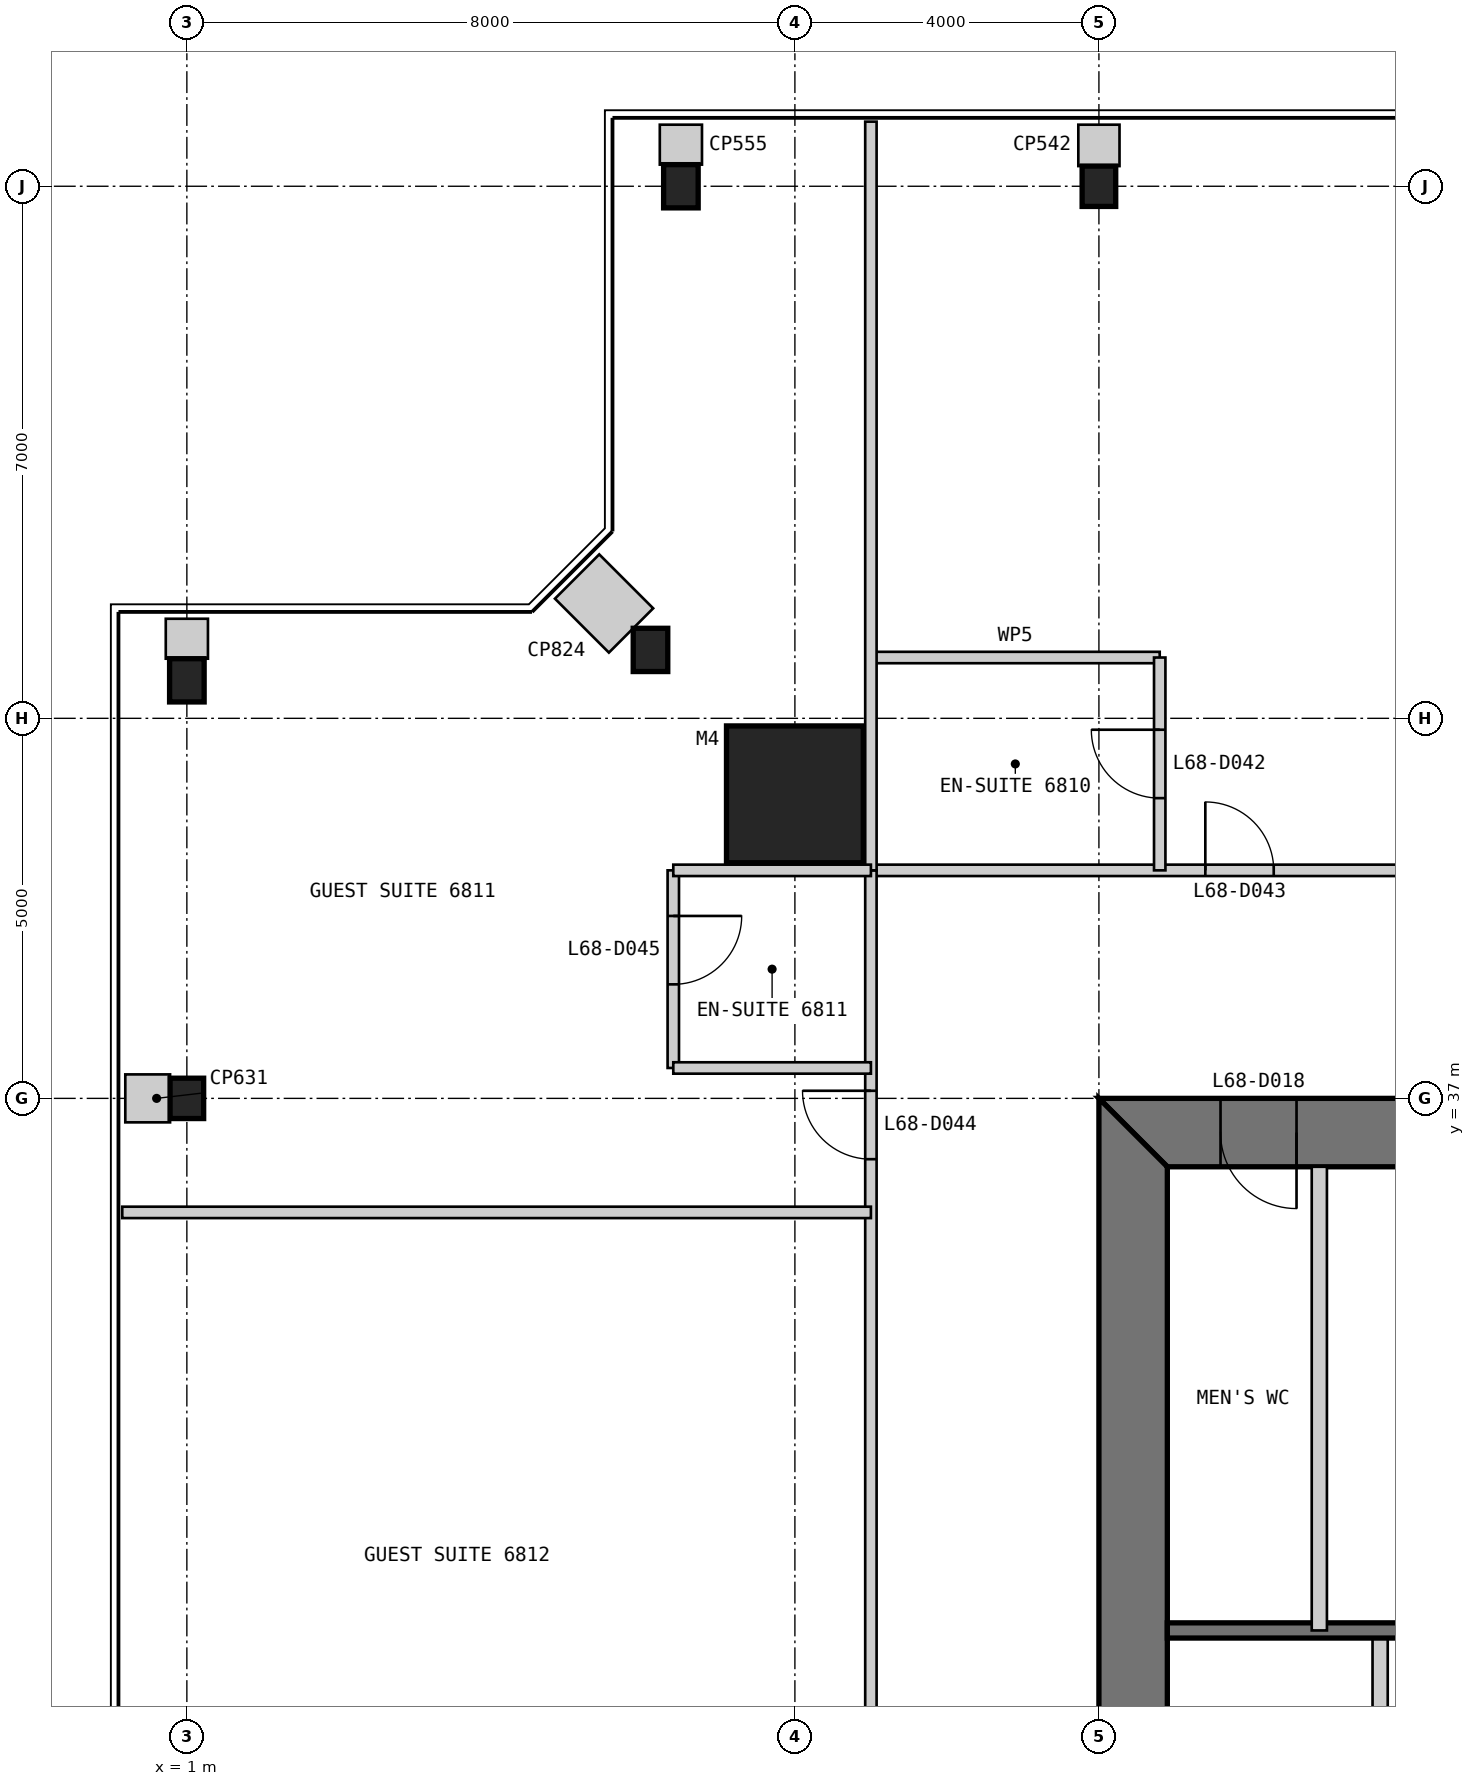
"""IFC4 building model, lengths in metres.
Left out: names, types, materials, properties, quantities, classifications, styles, units other than length and angle.
Written with IfcOpenShell. Run it as: python <this file> out.ifc"""

import sys

from ifc_helpers import new_model, si_unit, direction, frame, frame_2d, origin, origin_2d, place, context, subcontext, project, spatial, polyline, rectangle, i_section, outline, extrude, element, fill, save


model = new_model("IFC4")
c1 = context("Model", 3, precision=1e-05, world=origin(), true_north=direction((0.0, 1.0)))
c2 = subcontext(c1, "Body", "Model", "MODEL_VIEW")
j1 = project(units=[si_unit("LENGTHUNIT", "METRE"), si_unit("PLANEANGLEUNIT", "RADIAN")], contexts=[c1])
p1 = place(None, origin())
s1 = spatial("IfcSite", under=j1, at=p1, CompositionType="ELEMENT")
p2 = place(p1, origin())
s2 = spatial("IfcBuilding", under=s1, at=p2, CompositionType="ELEMENT")
p3 = place(p2, frame((0.0, 0.0, 283.2)))
s3 = spatial("IfcBuildingStorey", under=s2, at=p3, CompositionType="ELEMENT", Elevation=283.2)
p4 = place(p3, frame((9.0, 41.0, 0.0), z_axis=(0.0, 0.0, 1.0), x_axis=(1.0, 0.0, 0.0)))
e1 = element("IfcColumn", 1, at=p4, inside=s3, PredefinedType="COLUMN", context=c2, shape_type="SweptSolid", body=[
    extrude(rectangle(XDim=1.8, YDim=1.8, at=origin_2d()), origin(), (0.0, 0.0, 1.0), 3.4),
])
p5 = place(p3, frame((13.0, 49.0, 0.0), z_axis=(0.0, 0.0, 1.0), x_axis=(1.0, 0.0, 0.0)))
e2 = element("IfcColumn", 2, at=p5, inside=s3, PredefinedType="COLUMN", context=c2, shape_type="SweptSolid", body=[
    extrude(i_section(OverallWidth=0.442, OverallDepth=0.531, WebThickness=0.066, FlangeThickness=0.106, at=origin_2d()), origin(), (0.0, 0.0, 1.0), 3.4),
])
for number, where, z_axis, x_axis in (
    (3, (7.5, 49.0, 0.0), (0.0, 0.0, 1.0), (1.0, 0.0, 0.0)),
    (4, (7.1, 42.9, 0.0), (0.0, 0.0, 1.0), (1.0, 0.0, 0.0)),
    (5, (1.0, 42.5, 0.0), (0.0, 0.0, 1.0), (1.0, 0.0, 0.0)),
):
    element("IfcColumn", number, at=place(p3, frame(where, z_axis=z_axis, x_axis=x_axis)), inside=s3, PredefinedType="COLUMN", context=c2, shape_type="SweptSolid", body=[
        extrude(i_section(OverallWidth=0.455, OverallDepth=0.569, WebThickness=0.078, FlangeThickness=0.125, at=origin_2d()), origin(), (0.0, 0.0, 1.0), 3.4),
    ])
p6 = place(p3, frame((1.0, 37.0, 0.0), z_axis=(0.0, 0.0, 1.0), x_axis=(1.0, 0.0, 0.0)))
e6 = element("IfcColumn", 6, at=p6, inside=s3, PredefinedType="COLUMN", context=c2, shape_type="SweptSolid", body=[
    extrude(i_section(OverallWidth=0.442, OverallDepth=0.531, WebThickness=0.066, FlangeThickness=0.106, at=origin_2d()), origin(), (0.0, 0.0, 1.0), 3.4),
])
p7 = place(p3, frame((37.0, 36.55, 0.0), z_axis=(0.0, 0.0, 1.0), x_axis=(-1.0, 0.0, 0.0)))
e7 = element("IfcWall", 7, at=p7, inside=s3, PredefinedType="SHEAR", context=c2, shape_type="SweptSolid", body=[
    extrude(outline(polyline([(0.0, -0.45), (24.0, -0.45), (23.1, 0.45), (0.9, 0.45), (0.0, -0.45)])), origin(), (0.0, 0.0, 1.0), 3.4),
])
p8 = place(p7, frame((4.9, 0.0, 0.0)))
e8 = element("IfcOpeningElement", 8, at=p8, cuts=e7, PredefinedType="OPENING", context=c2, shape_type="SweptSolid", body=[
    extrude(rectangle(XDim=1.0, YDim=2.2, at=frame_2d((0.5, 1.1))), frame((0.0, 0.46, 0.0), z_axis=(0.0, -1.0, 0.0), x_axis=(1.0, 0.0, 0.0)), (0.0, 0.0, 1.0), 0.92),
])
p9 = place(p7, frame((8.9, 0.0, 0.0)))
e9 = element("IfcOpeningElement", 9, at=p9, cuts=e7, PredefinedType="OPENING", context=c2, shape_type="SweptSolid", body=[
    extrude(rectangle(XDim=1.1, YDim=2.2, at=frame_2d((0.55, 1.1))), frame((0.0, 0.46, 0.0), z_axis=(0.0, -1.0, 0.0), x_axis=(1.0, 0.0, 0.0)), (0.0, 0.0, 1.0), 0.92),
])
p10 = place(p7, frame((15.05, 0.0, 0.0)))
e10 = element("IfcOpeningElement", 10, at=p10, cuts=e7, PredefinedType="OPENING", context=c2, shape_type="SweptSolid", body=[
    extrude(rectangle(XDim=0.9, YDim=2.2, at=frame_2d((0.45, 1.1))), frame((0.0, 0.46, 0.0), z_axis=(0.0, -1.0, 0.0), x_axis=(1.0, 0.0, 0.0)), (0.0, 0.0, 1.0), 0.92),
])
p11 = place(p7, frame((17.9, 0.0, 0.0)))
e11 = element("IfcOpeningElement", 11, at=p11, cuts=e7, PredefinedType="OPENING", context=c2, shape_type="SweptSolid", body=[
    extrude(rectangle(XDim=1.0, YDim=2.2, at=frame_2d((0.5, 1.1))), frame((0.0, 0.46, 0.0), z_axis=(0.0, -1.0, 0.0), x_axis=(1.0, 0.0, 0.0)), (0.0, 0.0, 1.0), 0.92),
])
p12 = place(p7, frame((21.4, 0.0, 0.0)))
e12 = element("IfcOpeningElement", 12, at=p12, cuts=e7, PredefinedType="OPENING", context=c2, shape_type="SweptSolid", body=[
    extrude(rectangle(XDim=1.0, YDim=2.2, at=frame_2d((0.5, 1.1))), frame((0.0, 0.46, 0.0), z_axis=(0.0, -1.0, 0.0), x_axis=(1.0, 0.0, 0.0)), (0.0, 0.0, 1.0), 0.92),
])
p13 = place(p3, frame((13.45, 36.1, 0.0), z_axis=(0.0, 0.0, 1.0), x_axis=(0.0, -1.0, 0.0)))
e13 = element("IfcWall", 13, at=p13, inside=s3, PredefinedType="SHEAR", context=c2, shape_type="SweptSolid", body=[
    extrude(outline(polyline([(-0.9, -0.45), (23.1, -0.45), (22.2, 0.45), (0.0, 0.45), (-0.9, -0.45)])), origin(), (0.0, 0.0, 1.0), 3.4),
])
p14 = place(p13, frame((20.2, 0.0, 0.0)))
e14 = element("IfcOpeningElement", 14, at=p14, cuts=e13, PredefinedType="OPENING", context=c2, shape_type="SweptSolid", body=[
    extrude(rectangle(XDim=1.0, YDim=2.2, at=frame_2d((0.5, 1.1))), frame((0.0, 0.46, 0.0), z_axis=(0.0, -1.0, 0.0), x_axis=(1.0, 0.0, 0.0)), (0.0, 0.0, 1.0), 0.92),
])
p15 = place(p13, frame((17.25, 0.0, 0.0)))
e15 = element("IfcOpeningElement", 15, at=p15, cuts=e13, PredefinedType="OPENING", context=c2, shape_type="SweptSolid", body=[
    extrude(rectangle(XDim=0.9, YDim=2.2, at=frame_2d((0.45, 1.1))), frame((0.0, 0.46, 0.0), z_axis=(0.0, -1.0, 0.0), x_axis=(1.0, 0.0, 0.0)), (0.0, 0.0, 1.0), 0.92),
])
p16 = place(p3, frame((16.7, 13.9, 0.0), z_axis=(0.0, 0.0, 1.0), x_axis=(0.0, 1.0, 0.0)))
e16 = element("IfcWall", 16, at=p16, inside=s3, PredefinedType="PARTITIONING", context=c2, shape_type="SweptSolid", body=[
    extrude(rectangle(XDim=16.1, YDim=0.2, at=frame_2d((8.05, 0.0))), origin(), (0.0, 0.0, 1.0), 3.2),
])
p17 = place(p16, frame((8.15, 0.0, 0.0)))
e17 = element("IfcOpeningElement", 17, at=p17, cuts=e16, PredefinedType="OPENING", context=c2, shape_type="SweptSolid", body=[
    extrude(rectangle(XDim=0.9, YDim=2.2, at=frame_2d((0.45, 1.1))), frame((0.0, 0.11, 0.0), z_axis=(0.0, -1.0, 0.0), x_axis=(1.0, 0.0, 0.0)), (0.0, 0.0, 1.0), 0.22),
])
p18 = place(p16, frame((12.4, 0.0, 0.0)))
e18 = element("IfcOpeningElement", 18, at=p18, cuts=e16, PredefinedType="OPENING", context=c2, shape_type="SweptSolid", body=[
    extrude(rectangle(XDim=0.9, YDim=2.2, at=frame_2d((0.45, 1.1))), frame((0.0, 0.11, 0.0), z_axis=(0.0, -1.0, 0.0), x_axis=(1.0, 0.0, 0.0)), (0.0, 0.0, 1.0), 0.22),
])
p19 = place(p3, frame((29.7, 30.0, 0.0), z_axis=(0.0, 0.0, 1.0), x_axis=(-1.0, 0.0, 0.0)))
e19 = element("IfcWall", 19, at=p19, inside=s3, PredefinedType="SOLIDWALL", context=c2, shape_type="SweptSolid", body=[
    extrude(rectangle(XDim=15.8, YDim=0.2, at=frame_2d((7.9, 0.0))), origin(), (0.0, 0.0, 1.0), 3.2),
])
p20 = place(p3, frame((15.9, 36.1, 0.0), z_axis=(0.0, 0.0, 1.0), x_axis=(0.0, -1.0, 0.0)))
e20 = element("IfcWall", 20, at=p20, inside=s3, PredefinedType="PARTITIONING", context=c2, shape_type="SweptSolid", body=[
    extrude(rectangle(XDim=6.1, YDim=0.2, at=frame_2d((3.05, 0.0))), origin(), (0.0, 0.0, 1.0), 3.2),
])
p21 = place(p3, frame((40.0, 40.0, 0.0), z_axis=(0.0, 0.0, 1.0), x_axis=(-1.0, 0.0, 0.0)))
e21 = element("IfcWall", 21, at=p21, inside=s3, PredefinedType="PARTITIONING", context=c2, shape_type="SweptSolid", body=[
    extrude(rectangle(XDim=30.0, YDim=0.15, at=frame_2d((15.0, 0.0))), origin(), (0.0, 0.0, 1.0), 3.25),
])
p22 = place(p21, frame((2.9, 0.0, 0.0)))
e22 = element("IfcOpeningElement", 22, at=p22, cuts=e21, PredefinedType="OPENING", context=c2, shape_type="SweptSolid", body=[
    extrude(rectangle(XDim=0.9, YDim=2.1, at=frame_2d((0.45, 1.05))), frame((0.0, 0.085, 0.0), z_axis=(0.0, -1.0, 0.0), x_axis=(1.0, 0.0, 0.0)), (0.0, 0.0, 1.0), 0.17),
])
p23 = place(p21, frame((11.2, 0.0, 0.0)))
e23 = element("IfcOpeningElement", 23, at=p23, cuts=e21, PredefinedType="OPENING", context=c2, shape_type="SweptSolid", body=[
    extrude(rectangle(XDim=0.9, YDim=2.1, at=frame_2d((0.45, 1.05))), frame((0.0, 0.085, 0.0), z_axis=(0.0, -1.0, 0.0), x_axis=(1.0, 0.0, 0.0)), (0.0, 0.0, 1.0), 0.17),
])
p24 = place(p21, frame((24.7, 0.0, 0.0)))
e24 = element("IfcOpeningElement", 24, at=p24, cuts=e21, PredefinedType="OPENING", context=c2, shape_type="SweptSolid", body=[
    extrude(rectangle(XDim=0.9, YDim=2.1, at=frame_2d((0.45, 1.05))), frame((0.0, 0.085, 0.0), z_axis=(0.0, -1.0, 0.0), x_axis=(1.0, 0.0, 0.0)), (0.0, 0.0, 1.0), 0.17),
])
p25 = place(p3, frame((13.8, 42.8, 0.0), z_axis=(0.0, 0.0, 1.0), x_axis=(-1.0, 0.0, 0.0)))
e25 = element("IfcWall", 25, at=p25, inside=s3, PredefinedType="PARTITIONING", context=c2, shape_type="SweptSolid", body=[
    extrude(rectangle(XDim=3.8, YDim=0.15, at=frame_2d((1.9, 0.0))), origin(), (0.0, 0.0, 1.0), 3.25),
])
p26 = place(p3, frame((13.8, 42.8, 0.0), z_axis=(0.0, 0.0, 1.0), x_axis=(0.0, -1.0, 0.0)))
e26 = element("IfcWall", 26, at=p26, inside=s3, PredefinedType="PARTITIONING", context=c2, shape_type="SweptSolid", body=[
    extrude(rectangle(XDim=2.8, YDim=0.15, at=frame_2d((1.4, 0.0))), origin(), (0.0, 0.0, 1.0), 3.25),
])
p27 = place(p26, frame((0.95, 0.0, 0.0)))
e27 = element("IfcOpeningElement", 27, at=p27, cuts=e26, PredefinedType="OPENING", context=c2, shape_type="SweptSolid", body=[
    extrude(rectangle(XDim=0.9, YDim=2.1, at=frame_2d((0.45, 1.05))), frame((0.0, 0.085, 0.0), z_axis=(0.0, -1.0, 0.0), x_axis=(1.0, 0.0, 0.0)), (0.0, 0.0, 1.0), 0.17),
])
p28 = place(p3, frame((10.0, 40.0, 0.0), z_axis=(0.0, 0.0, 1.0), x_axis=(0.0, -1.0, 0.0)))
e28 = element("IfcWall", 28, at=p28, inside=s3, PredefinedType="PARTITIONING", context=c2, shape_type="SweptSolid", body=[
    extrude(rectangle(XDim=30.0, YDim=0.15, at=frame_2d((15.0, 0.0))), origin(), (0.0, 0.0, 1.0), 2.638),
])
p29 = place(p28, frame((2.9, 0.0, 0.0)))
e29 = element("IfcOpeningElement", 29, at=p29, cuts=e28, PredefinedType="OPENING", context=c2, shape_type="SweptSolid", body=[
    extrude(rectangle(XDim=0.9, YDim=2.1, at=frame_2d((0.45, 1.05))), frame((0.0, 0.085, 0.0), z_axis=(0.0, -1.0, 0.0), x_axis=(1.0, 0.0, 0.0)), (0.0, 0.0, 1.0), 0.17),
])
p30 = place(p28, frame((11.2, 0.0, 0.0)))
e30 = element("IfcOpeningElement", 30, at=p30, cuts=e28, PredefinedType="OPENING", context=c2, shape_type="SweptSolid", body=[
    extrude(rectangle(XDim=0.9, YDim=2.1, at=frame_2d((0.45, 1.05))), frame((0.0, 0.085, 0.0), z_axis=(0.0, -1.0, 0.0), x_axis=(1.0, 0.0, 0.0)), (0.0, 0.0, 1.0), 0.17),
])
p31 = place(p28, frame((24.7, 0.0, 0.0)))
e31 = element("IfcOpeningElement", 31, at=p31, cuts=e28, PredefinedType="OPENING", context=c2, shape_type="SweptSolid", body=[
    extrude(rectangle(XDim=0.9, YDim=2.1, at=frame_2d((0.45, 1.05))), frame((0.0, 0.085, 0.0), z_axis=(0.0, -1.0, 0.0), x_axis=(1.0, 0.0, 0.0)), (0.0, 0.0, 1.0), 0.17),
])
p32 = place(p3, frame((10.0, 49.85, 0.0), z_axis=(0.0, 0.0, 1.0), x_axis=(0.0, -1.0, 0.0)))
e32 = element("IfcWall", 32, at=p32, inside=s3, PredefinedType="PARTITIONING", context=c2, shape_type="SweptSolid", body=[
    extrude(rectangle(XDim=9.85, YDim=0.15, at=frame_2d((4.925, 0.0))), origin(), (0.0, 0.0, 1.0), 3.25),
])
p33 = place(p3, frame((7.4, 40.0, 0.0), z_axis=(0.0, 0.0, 1.0), x_axis=(0.0, -1.0, 0.0)))
e33 = element("IfcWall", 33, at=p33, inside=s3, PredefinedType="PARTITIONING", context=c2, shape_type="SweptSolid", body=[
    extrude(rectangle(XDim=2.6, YDim=0.15, at=frame_2d((1.3, 0.0))), origin(), (0.0, 0.0, 1.0), 3.25),
])
p34 = place(p33, frame((0.6, 0.0, 0.0)))
e34 = element("IfcOpeningElement", 34, at=p34, cuts=e33, PredefinedType="OPENING", context=c2, shape_type="SweptSolid", body=[
    extrude(rectangle(XDim=0.9, YDim=2.1, at=frame_2d((0.45, 1.05))), frame((0.0, 0.085, 0.0), z_axis=(0.0, -1.0, 0.0), x_axis=(1.0, 0.0, 0.0)), (0.0, 0.0, 1.0), 0.17),
])
for number, where, z_axis, x_axis in (
    (35, (7.4, 40.0, 0.0), (0.0, 0.0, 1.0), (1.0, 0.0, 0.0)),
    (36, (7.4, 37.4, 0.0), (0.0, 0.0, 1.0), (1.0, 0.0, 0.0)),
):
    element("IfcWall", number, at=place(p3, frame(where, z_axis=z_axis, x_axis=x_axis)), inside=s3, PredefinedType="PARTITIONING", context=c2, shape_type="SweptSolid", body=[
        extrude(rectangle(XDim=2.6, YDim=0.15, at=frame_2d((1.3, 0.0))), origin(), (0.0, 0.0, 1.0), 3.25),
    ])
p35 = place(p3, frame((0.15, 35.5, 0.0), z_axis=(0.0, 0.0, 1.0), x_axis=(1.0, 0.0, 0.0)))
e37 = element("IfcWall", 37, at=p35, inside=s3, PredefinedType="PARTITIONING", context=c2, shape_type="SweptSolid", body=[
    extrude(rectangle(XDim=9.85, YDim=0.15, at=frame_2d((4.925, 0.0))), origin(), (0.0, 0.0, 1.0), 3.25),
])
p36 = place(p3, frame((13.0, 49.81, 0.0), z_axis=(0.0, 0.0, 1.0), x_axis=(0.0, -1.0, 0.0)))
e38 = element("IfcWall", 38, at=p36, inside=s3, PredefinedType="PARTITIONING", context=c2, shape_type="SweptSolid", body=[
    extrude(rectangle(XDim=0.545, YDim=0.542, at=frame_2d((0.272, 0.0))), origin(), (0.0, 0.0, 1.0), 3.25),
])
p37 = place(p3, frame((7.5, 49.81, 0.0), z_axis=(0.0, 0.0, 1.0), x_axis=(0.0, -1.0, 0.0)))
e39 = element("IfcWall", 39, at=p37, inside=s3, PredefinedType="PARTITIONING", context=c2, shape_type="SweptSolid", body=[
    extrude(rectangle(XDim=0.526, YDim=0.555, at=frame_2d((0.263, 0.0))), origin(), (0.0, 0.0, 1.0), 3.25),
])
p38 = place(p3, frame((6.134, 43.866, 0.0), z_axis=(0.0, 0.0, 1.0), x_axis=(0.707106781187, -0.707106781187, 0.0)))
e40 = element("IfcWall", 40, at=p38, inside=s3, PredefinedType="PARTITIONING", context=c2, shape_type="SweptSolid", body=[
    extrude(rectangle(XDim=1.004, YDim=0.824, at=frame_2d((0.502, 0.0))), origin(), (0.0, 0.0, 1.0), 3.25),
])
p39 = place(p3, frame((1.0, 43.31, 0.0), z_axis=(0.0, 0.0, 1.0), x_axis=(0.0, -1.0, 0.0)))
e41 = element("IfcWall", 41, at=p39, inside=s3, PredefinedType="PARTITIONING", context=c2, shape_type="SweptSolid", body=[
    extrude(rectangle(XDim=0.526, YDim=0.555, at=frame_2d((0.263, 0.0))), origin(), (0.0, 0.0, 1.0), 3.25),
])
p40 = place(p3, frame((0.19, 37.0, 0.0), z_axis=(0.0, 0.0, 1.0), x_axis=(1.0, 0.0, 0.0)))
e42 = element("IfcWall", 42, at=p40, inside=s3, PredefinedType="PARTITIONING", context=c2, shape_type="SweptSolid", body=[
    extrude(rectangle(XDim=0.589, YDim=0.631, at=frame_2d((0.294, 0.0))), origin(), (0.0, 0.0, 1.0), 3.25),
])
p41 = place(p12, origin())
e43 = element("IfcDoor", 43, at=p41, inside=s3, OperationType="SINGLE_SWING_LEFT", PredefinedType="DOOR", context=c2, shape_type="SweptSolid", body=[
    extrude(rectangle(XDim=1.0, YDim=2.2, at=frame_2d((0.5, 1.1))), frame((0.0, 0.025, 0.0), z_axis=(0.0, -1.0, 0.0), x_axis=(1.0, 0.0, 0.0)), (0.0, 0.0, 1.0), 0.05),
    extrude(outline(polyline([(0.0, 0.0), (0.04, 0.0), (0.04, 2.16), (0.96, 2.16), (0.96, 0.0), (1.0, 0.0), (1.0, 2.2), (0.0, 2.2), (0.0, 0.0)])), frame((0.0, 0.3, 0.0), z_axis=(0.0, -1.0, 0.0), x_axis=(1.0, 0.0, 0.0)), (0.0, 0.0, 1.0), 0.6),
])
fill(e12, e43)
p42 = place(p27, frame((0.9, 0.0, 0.0), z_axis=(0.0, 0.0, 1.0), x_axis=(-1.0, 0.0, 0.0)))
e44 = element("IfcDoor", 44, at=p42, inside=s3, OperationType="SINGLE_SWING_RIGHT", PredefinedType="DOOR", context=c2, shape_type="SweptSolid", body=[
    extrude(rectangle(XDim=0.9, YDim=2.1, at=frame_2d((0.45, 1.05))), frame((0.0, 0.025, 0.0), z_axis=(0.0, -1.0, 0.0), x_axis=(1.0, 0.0, 0.0)), (0.0, 0.0, 1.0), 0.05),
])
fill(e27, e44)
p43 = place(p24, frame((0.9, 0.0, 0.0), z_axis=(0.0, 0.0, 1.0), x_axis=(-1.0, 0.0, 0.0)))
e45 = element("IfcDoor", 45, at=p43, inside=s3, OperationType="SINGLE_SWING_LEFT", PredefinedType="DOOR", context=c2, shape_type="SweptSolid", body=[
    extrude(rectangle(XDim=0.9, YDim=2.1, at=frame_2d((0.45, 1.05))), frame((0.0, 0.025, 0.0), z_axis=(0.0, -1.0, 0.0), x_axis=(1.0, 0.0, 0.0)), (0.0, 0.0, 1.0), 0.05),
])
fill(e24, e45)
p44 = place(p29, frame((0.9, 0.0, 0.0), z_axis=(0.0, 0.0, 1.0), x_axis=(-1.0, 0.0, 0.0)))
e46 = element("IfcDoor", 46, at=p44, inside=s3, OperationType="SINGLE_SWING_RIGHT", PredefinedType="DOOR", context=c2, shape_type="SweptSolid", body=[
    extrude(rectangle(XDim=0.9, YDim=2.1, at=frame_2d((0.45, 1.05))), frame((0.0, 0.025, 0.0), z_axis=(0.0, -1.0, 0.0), x_axis=(1.0, 0.0, 0.0)), (0.0, 0.0, 1.0), 0.05),
])
fill(e29, e46)
p45 = place(p34, origin())
e47 = element("IfcDoor", 47, at=p45, inside=s3, OperationType="SINGLE_SWING_LEFT", PredefinedType="DOOR", context=c2, shape_type="SweptSolid", body=[
    extrude(rectangle(XDim=0.9, YDim=2.1, at=frame_2d((0.45, 1.05))), frame((0.0, 0.025, 0.0), z_axis=(0.0, -1.0, 0.0), x_axis=(1.0, 0.0, 0.0)), (0.0, 0.0, 1.0), 0.05),
])
fill(e34, e47)
save(model, sys.argv[1])
